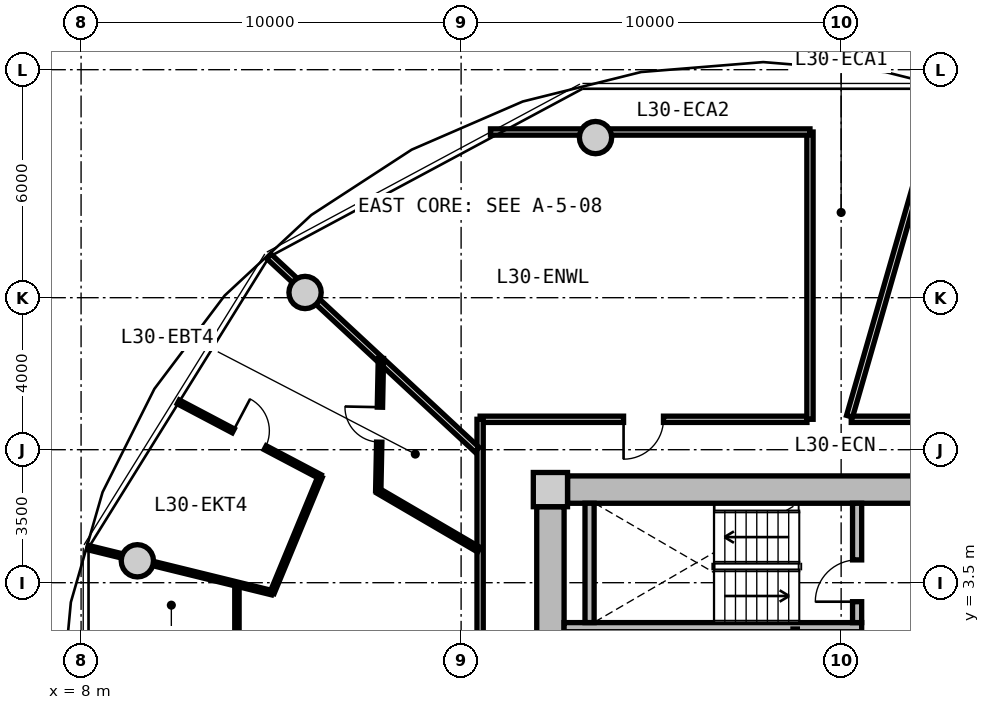
"""IFC4 building model, lengths in metres.
Left out: names, types, materials, properties, quantities, classifications, styles, units other than length and angle.
Written with IfcOpenShell. Run it as: python <this file> out.ifc"""

import sys

from ifc_helpers import new_model, si_unit, direction, frame, frame_2d, origin, origin_2d, place, context, subcontext, project, spatial, rectangle, circle, extrude, source, transform, mapped, element, fill, save


model = new_model("IFC4")
c1 = context("Model", 3, precision=1e-05, world=origin(), true_north=direction((0.0, 1.0)))
c2 = subcontext(c1, "Body", "Model", "MODEL_VIEW")
j1 = project(units=[si_unit("LENGTHUNIT", "METRE"), si_unit("PLANEANGLEUNIT", "RADIAN")], contexts=[c1])
p1 = place(None, origin())
s1 = spatial("IfcSite", under=j1, at=p1, CompositionType="ELEMENT")
p2 = place(p1, origin())
s2 = spatial("IfcBuilding", under=s1, at=p2, CompositionType="ELEMENT")
p3 = place(p2, frame((0.0, 0.0, 99.3)))
s3 = spatial("IfcBuildingStorey", under=s2, at=p3, CompositionType="ELEMENT", Elevation=99.3)
m1 = source(origin(), c2, "Body", "SweptSolid", [
    extrude(rectangle(XDim=0.9, YDim=0.9, at=origin_2d()), origin(), (0.0, 0.0, 1.0), 3.05),
])
p4 = place(p3, frame((20.35, 5.95, 0.0), z_axis=(0.0, 0.0, 1.0), x_axis=(1.0, 0.0, 0.0)))
e1 = element("IfcColumn", 1, at=p4, inside=s3, PredefinedType="COLUMN", context=c2, shape_type="MappedRepresentation", body=[
    mapped(m1, transform((0.0, 0.0, 0.0), x_axis=(1.0, 0.0, 0.0), y_axis=(0.0, 1.0, 0.0), z_axis=(0.0, 0.0, 1.0), scale=1.0)),
])
m2 = source(origin(), c2, "Body", "SweptSolid", [
    extrude(rectangle(XDim=14.4, YDim=0.72, at=frame_2d((7.2, 0.0))), origin(), (0.0, 0.0, 1.0), 2.79),
])
p5 = place(p3, frame((20.8, 5.95, 0.0), z_axis=(0.0, 0.0, 1.0), x_axis=(1.0, 0.0, 0.0)))
e2 = element("IfcWall", 2, at=p5, inside=s3, PredefinedType="SHEAR", context=c2, shape_type="MappedRepresentation", body=[
    mapped(m2, transform((0.0, 0.0, 0.0), x_axis=(1.0, 0.0, 0.0), y_axis=(0.0, 1.0, 0.0), z_axis=(0.0, 0.0, 1.0), scale=1.0)),
])
m3 = source(origin(), c2, "Body", "SweptSolid", [
    extrude(rectangle(XDim=11.0, YDim=0.72, at=frame_2d((5.5, 0.0))), origin(), (0.0, 0.0, 1.0), 2.79),
])
p6 = place(p3, frame((20.35, -5.5, 0.0), z_axis=(0.0, 0.0, 1.0), x_axis=(0.0, 1.0, 0.0)))
e3 = element("IfcWall", 3, at=p6, inside=s3, PredefinedType="SHEAR", context=c2, shape_type="MappedRepresentation", body=[
    mapped(m3, transform((0.0, 0.0, 0.0), x_axis=(1.0, 0.0, 0.0), y_axis=(0.0, 1.0, 0.0), z_axis=(0.0, 0.0, 1.0), scale=1.0)),
])
p7 = place(p6, frame((3.8, 0.0, 0.0)))
e4 = element("IfcOpeningElement", 4, at=p7, cuts=e3, PredefinedType="OPENING", context=c2, shape_type="SweptSolid", body=[
    extrude(rectangle(XDim=1.2, YDim=2.15, at=frame_2d((0.6, 1.075))), frame((0.0, 0.37, 0.0), z_axis=(0.0, -1.0, 0.0), x_axis=(1.0, 0.0, 0.0)), (0.0, 0.0, 1.0), 0.74),
])
m4 = source(origin(), c2, "Body", "SweptSolid", [
    extrude(circle(Radius=0.425, at=origin_2d()), origin(), (0.0, 0.0, 1.0), 3.05),
])
for number, where, z_axis, x_axis in (
    (5, (21.537, 15.213, 0.0), (0.0, 0.0, 1.0), (1.0, 0.0, 0.0)),
    (6, (13.894, 11.137, 0.0), (0.0, 0.0, 1.0), (1.0, 0.0, 0.0)),
    (7, (9.481, 4.076, 0.0), (0.0, 0.0, 1.0), (1.0, 0.0, 0.0)),
):
    element("IfcColumn", number, at=place(p3, frame(where, z_axis=z_axis, x_axis=x_axis)), inside=s3, PredefinedType="COLUMN", context=c2, shape_type="MappedRepresentation", body=[
        mapped(m4, transform((0.0, 0.0, 0.0), x_axis=(1.0, 0.0, 0.0), y_axis=(0.0, 1.0, 0.0), z_axis=(0.0, 0.0, 1.0), scale=1.0)),
    ])
m5 = source(origin(), c2, "Body", "SweptSolid", [
    extrude(rectangle(XDim=7.83, YDim=0.24, at=frame_2d((3.915, 0.0))), origin(), (0.0, 0.0, 1.0), 2.79),
])
p8 = place(p3, frame((20.71, 2.33, 0.0), z_axis=(0.0, 0.0, 1.0), x_axis=(1.0, 0.0, 0.0)))
e8 = element("IfcWall", 8, at=p8, inside=s3, PredefinedType="PARTITIONING", context=c2, shape_type="MappedRepresentation", body=[
    mapped(m5, transform((0.0, 0.0, 0.0), x_axis=(1.0, 0.0, 0.0), y_axis=(0.0, 1.0, 0.0), z_axis=(0.0, 0.0, 1.0), scale=1.0)),
])
m6 = source(origin(), c2, "Body", "SweptSolid", [
    extrude(rectangle(XDim=3.14, YDim=0.24, at=frame_2d((1.57, 0.0))), origin(), (0.0, 0.0, 1.0), 2.79),
])
p9 = place(p3, frame((21.38, 2.45, 0.0), z_axis=(0.0, 0.0, 1.0), x_axis=(0.0, 1.0, 0.0)))
e9 = element("IfcWall", 9, at=p9, inside=s3, PredefinedType="PARTITIONING", context=c2, shape_type="MappedRepresentation", body=[
    mapped(m6, transform((0.0, 0.0, 0.0), x_axis=(1.0, 0.0, 0.0), y_axis=(0.0, 1.0, 0.0), z_axis=(0.0, 0.0, 1.0), scale=1.0)),
])
p10 = place(p3, frame((28.42, 2.45, 0.0), z_axis=(0.0, 0.0, 1.0), x_axis=(0.0, 1.0, 0.0)))
e10 = element("IfcWall", 10, at=p10, inside=s3, PredefinedType="PARTITIONING", context=c2, shape_type="MappedRepresentation", body=[
    mapped(m6, transform((0.0, 0.0, 0.0), x_axis=(1.0, 0.0, 0.0), y_axis=(0.0, 1.0, 0.0), z_axis=(0.0, 0.0, 1.0), scale=1.0)),
])
p11 = place(p10, frame((0.55, 0.0, 0.0)))
e11 = element("IfcOpeningElement", 11, at=p11, cuts=e10, PredefinedType="OPENING", context=c2, shape_type="SweptSolid", body=[
    extrude(rectangle(XDim=1.1, YDim=2.15, at=frame_2d((0.55, 1.075))), frame((0.0, 0.13, 0.0), z_axis=(0.0, -1.0, 0.0), x_axis=(1.0, 0.0, 0.0)), (0.0, 0.0, 1.0), 0.26),
])
m7 = source(origin(), c2, "Body", "SweptSolid", [
    extrude(rectangle(XDim=2.33, YDim=0.115, at=frame_2d((1.165, 0.0))), origin(), (0.0, 0.0, 1.0), 2.775),
])
p12 = place(p3, frame((26.79, -0.05, 0.0), z_axis=(0.0, 0.0, 1.0), x_axis=(0.0, 1.0, 0.0)))
e12 = element("IfcWall", 12, at=p12, inside=s3, PredefinedType="PARTITIONING", context=c2, shape_type="MappedRepresentation", body=[
    mapped(m7, transform((0.0, 0.0, 0.0), x_axis=(1.0, 0.0, 0.0), y_axis=(0.0, 1.0, 0.0), z_axis=(0.0, 0.0, 1.0), scale=1.0)),
])
m8 = source(origin(), c2, "Body", "SweptSolid", [
    extrude(rectangle(XDim=8.6, YDim=0.165, at=frame_2d((4.3, 0.0))), origin(), (0.0, 0.0, 1.0), 2.775),
])
p13 = place(p3, frame((18.5, 7.8, 0.0), z_axis=(0.0, 0.0, 1.0), x_axis=(1.0, 0.0, 0.0)))
e13 = element("IfcWall", 13, at=p13, inside=s3, PredefinedType="PARTITIONING", context=c2, shape_type="MappedRepresentation", body=[
    mapped(m8, transform((0.0, 0.0, 0.0), x_axis=(1.0, 0.0, 0.0), y_axis=(0.0, 1.0, 0.0), z_axis=(0.0, 0.0, 1.0), scale=1.0)),
])
p14 = place(p13, frame((3.775, 0.0, 0.0)))
e14 = element("IfcOpeningElement", 14, at=p14, cuts=e13, PredefinedType="OPENING", context=c2, shape_type="SweptSolid", body=[
    extrude(rectangle(XDim=1.05, YDim=2.15, at=frame_2d((0.525, 1.075))), frame((0.0, 0.093, 0.0), z_axis=(0.0, -1.0, 0.0), x_axis=(1.0, 0.0, 0.0)), (0.0, 0.0, 1.0), 0.185),
])
m9 = source(origin(), c2, "Body", "SweptSolid", [
    extrude(rectangle(XDim=9.234, YDim=0.165, at=frame_2d((4.617, 0.0))), origin(), (0.0, 0.0, 1.0), 2.775),
])
p15 = place(p3, frame((28.266, 7.8, 0.0), z_axis=(0.0, 0.0, 1.0), x_axis=(1.0, 0.0, 0.0)))
e15 = element("IfcWall", 15, at=p15, inside=s3, PredefinedType="PARTITIONING", context=c2, shape_type="MappedRepresentation", body=[
    mapped(m9, transform((0.0, 0.0, 0.0), x_axis=(1.0, 0.0, 0.0), y_axis=(0.0, 1.0, 0.0), z_axis=(0.0, 0.0, 1.0), scale=1.0)),
])
p16 = place(p15, frame((4.092, 0.0, 0.0)))
e16 = element("IfcOpeningElement", 16, at=p16, cuts=e15, PredefinedType="OPENING", context=c2, shape_type="SweptSolid", body=[
    extrude(rectangle(XDim=1.05, YDim=2.15, at=frame_2d((0.525, 1.075))), frame((0.0, 0.093, 0.0), z_axis=(0.0, -1.0, 0.0), x_axis=(1.0, 0.0, 0.0)), (0.0, 0.0, 1.0), 0.185),
])
m10 = source(origin(), c2, "Body", "SweptSolid", [
    extrude(rectangle(XDim=15.6, YDim=0.165, at=frame_2d((7.8, 0.0))), origin(), (0.0, 0.0, 1.0), 2.775),
])
p17 = place(p3, frame((18.5, -7.8, 0.0), z_axis=(0.0, 0.0, 1.0), x_axis=(0.0, 1.0, 0.0)))
e17 = element("IfcWall", 17, at=p17, inside=s3, PredefinedType="PARTITIONING", context=c2, shape_type="MappedRepresentation", body=[
    mapped(m10, transform((0.0, 0.0, 0.0), x_axis=(1.0, 0.0, 0.0), y_axis=(0.0, 1.0, 0.0), z_axis=(0.0, 0.0, 1.0), scale=1.0)),
])
p18 = place(p17, frame((5.673, 0.0, 0.0)))
e18 = element("IfcOpeningElement", 18, at=p18, cuts=e17, PredefinedType="OPENING", context=c2, shape_type="SweptSolid", body=[
    extrude(rectangle(XDim=1.05, YDim=2.15, at=frame_2d((0.525, 1.075))), frame((0.0, 0.093, 0.0), z_axis=(0.0, -1.0, 0.0), x_axis=(1.0, 0.0, 0.0)), (0.0, 0.0, 1.0), 0.185),
])
m11 = source(origin(), c2, "Body", "SweptSolid", [
    extrude(rectangle(XDim=8.989, YDim=0.165, at=frame_2d((4.495, 0.0))), origin(), (0.0, 0.0, 1.0), 2.275),
])
p19 = place(p3, frame((28.222, 7.88, 0.0), z_axis=(0.0, 0.0, 1.0), x_axis=(0.27702323008, 0.960863221274, 0.0)))
e19 = element("IfcWall", 19, at=p19, inside=s3, PredefinedType="PARTITIONING", context=c2, shape_type="MappedRepresentation", body=[
    mapped(m11, transform((0.0, 0.0, 0.0), x_axis=(1.0, 0.0, 0.0), y_axis=(0.0, 1.0, 0.0), z_axis=(0.0, 0.0, 1.0), scale=1.0)),
])
m12 = source(origin(), c2, "Body", "SweptSolid", [
    extrude(rectangle(XDim=7.482, YDim=0.165, at=frame_2d((3.741, 0.0))), origin(), (0.0, 0.0, 1.0), 2.275),
])
p20 = place(p3, frame((18.42, 6.998, 0.0), z_axis=(0.0, 0.0, 1.0), x_axis=(-0.732508698043, 0.680757671489, 0.0)))
e20 = element("IfcWall", 20, at=p20, inside=s3, PredefinedType="PARTITIONING", context=c2, shape_type="MappedRepresentation", body=[
    mapped(m12, transform((0.0, 0.0, 0.0), x_axis=(1.0, 0.0, 0.0), y_axis=(0.0, 1.0, 0.0), z_axis=(0.0, 0.0, 1.0), scale=1.0)),
])
m13 = source(origin(), c2, "Body", "SweptSolid", [
    extrude(rectangle(XDim=7.56, YDim=0.165, at=frame_2d((3.78, 0.0))), origin(), (0.0, 0.0, 1.0), 2.775),
])
p21 = place(p3, frame((27.18, 7.8, 0.0), z_axis=(0.0, 0.0, 1.0), x_axis=(0.0, 1.0, 0.0)))
e21 = element("IfcWall", 21, at=p21, inside=s3, PredefinedType="PARTITIONING", context=c2, shape_type="MappedRepresentation", body=[
    mapped(m13, transform((0.0, 0.0, 0.0), x_axis=(1.0, 0.0, 0.0), y_axis=(0.0, 1.0, 0.0), z_axis=(0.0, 0.0, 1.0), scale=1.0)),
])
m14 = source(origin(), c2, "Body", "SweptSolid", [
    extrude(rectangle(XDim=8.407, YDim=0.165, at=frame_2d((4.204, 0.0))), origin(), (0.0, 0.0, 1.0), 2.275),
])
p22 = place(p3, frame((18.773, 15.36, 0.0), z_axis=(0.0, 0.0, 1.0), x_axis=(1.0, 0.0, 0.0)))
e22 = element("IfcWall", 22, at=p22, inside=s3, PredefinedType="PARTITIONING", context=c2, shape_type="MappedRepresentation", body=[
    mapped(m14, transform((0.0, 0.0, 0.0), x_axis=(1.0, 0.0, 0.0), y_axis=(0.0, 1.0, 0.0), z_axis=(0.0, 0.0, 1.0), scale=1.0)),
])
m15 = source(origin(), c2, "Body", "SweptSolid", [
    extrude(rectangle(XDim=6.935, YDim=0.115, at=frame_2d((3.468, 0.0))), origin(), (0.0, 0.0, 1.0), 2.775),
])
p23 = place(p3, frame((12.101, 3.468, 0.0), z_axis=(0.0, 0.0, 1.0), x_axis=(0.0, -1.0, 0.0)))
e23 = element("IfcWall", 23, at=p23, inside=s3, PredefinedType="PARTITIONING", context=c2, shape_type="MappedRepresentation", body=[
    mapped(m15, transform((0.0, 0.0, 0.0), x_axis=(1.0, 0.0, 0.0), y_axis=(0.0, 1.0, 0.0), z_axis=(0.0, 0.0, 1.0), scale=1.0)),
])
p24 = place(p23, frame((2.993, 0.0, 0.0)))
e24 = element("IfcOpeningElement", 24, at=p24, cuts=e23, PredefinedType="OPENING", context=c2, shape_type="SweptSolid", body=[
    extrude(rectangle(XDim=0.95, YDim=2.1, at=frame_2d((0.475, 1.05))), frame((0.0, 0.067, 0.0), z_axis=(0.0, -1.0, 0.0), x_axis=(1.0, 0.0, 0.0)), (0.0, 0.0, 1.0), 0.135),
])
m16 = source(origin(), c2, "Body", "SweptSolid", [
    extrude(rectangle(XDim=4.992, YDim=0.115, at=frame_2d((2.496, 0.0))), origin(), (0.0, 0.0, 1.0), 2.275),
])
p25 = place(p3, frame((13.026, 3.236, 0.0), z_axis=(0.0, 0.0, 1.0), x_axis=(-0.971191841847, 0.238298985162, 0.0)))
e25 = element("IfcWall", 25, at=p25, inside=s3, PredefinedType="PARTITIONING", context=c2, shape_type="MappedRepresentation", body=[
    mapped(m16, transform((0.0, 0.0, 0.0), x_axis=(1.0, 0.0, 0.0), y_axis=(0.0, 1.0, 0.0), z_axis=(0.0, 0.0, 1.0), scale=1.0)),
])
m17 = source(origin(), c2, "Body", "SweptSolid", [
    extrude(rectangle(XDim=3.069, YDim=0.14, at=frame_2d((1.535, 0.0))), origin(), (0.0, 0.0, 1.0), 2.775),
])
p26 = place(p3, frame((18.47, 4.368, 0.0), z_axis=(0.0, 0.0, 1.0), x_axis=(-0.863524911282, 0.504306184371, 0.0)))
e26 = element("IfcWall", 26, at=p26, inside=s3, PredefinedType="PARTITIONING", context=c2, shape_type="MappedRepresentation", body=[
    mapped(m17, transform((0.0, 0.0, 0.0), x_axis=(1.0, 0.0, 0.0), y_axis=(0.0, 1.0, 0.0), z_axis=(0.0, 0.0, 1.0), scale=1.0)),
])
m18 = source(origin(), c2, "Body", "SweptSolid", [
    extrude(rectangle(XDim=3.487, YDim=0.14, at=frame_2d((1.743, 0.0))), origin(), (0.0, 0.0, 1.0), 2.775),
])
p27 = place(p3, frame((15.82, 5.916, 0.0), z_axis=(0.0, 0.0, 1.0), x_axis=(0.020026799331, 0.999799443543, 0.0)))
e27 = element("IfcWall", 27, at=p27, inside=s3, PredefinedType="PARTITIONING", context=c2, shape_type="MappedRepresentation", body=[
    mapped(m18, transform((0.0, 0.0, 0.0), x_axis=(1.0, 0.0, 0.0), y_axis=(0.0, 1.0, 0.0), z_axis=(0.0, 0.0, 1.0), scale=1.0)),
])
p28 = place(p27, frame((1.283, 0.0, 0.0)))
e28 = element("IfcOpeningElement", 28, at=p28, cuts=e27, PredefinedType="OPENING", context=c2, shape_type="SweptSolid", body=[
    extrude(rectangle(XDim=0.92, YDim=2.1, at=frame_2d((0.46, 1.05))), frame((0.0, 0.08, 0.0), z_axis=(0.0, -1.0, 0.0), x_axis=(1.0, 0.0, 0.0)), (0.0, 0.0, 1.0), 0.16),
])
m19 = source(origin(), c2, "Body", "SweptSolid", [
    extrude(rectangle(XDim=4.221, YDim=0.115, at=frame_2d((2.11, 0.0))), origin(), (0.0, 0.0, 1.0), 2.775),
])
p29 = place(p3, frame((14.292, 6.29, 0.0), z_axis=(0.0, 0.0, 1.0), x_axis=(-0.88458298465, 0.466382829087, 0.0)))
e29 = element("IfcWall", 29, at=p29, inside=s3, PredefinedType="PARTITIONING", context=c2, shape_type="MappedRepresentation", body=[
    mapped(m19, transform((0.0, 0.0, 0.0), x_axis=(1.0, 0.0, 0.0), y_axis=(0.0, 1.0, 0.0), z_axis=(0.0, 0.0, 1.0), scale=1.0)),
])
p30 = place(p29, frame((1.635, 0.0, 0.0)))
e30 = element("IfcOpeningElement", 30, at=p30, cuts=e29, PredefinedType="OPENING", context=c2, shape_type="SweptSolid", body=[
    extrude(rectangle(XDim=0.95, YDim=2.1, at=frame_2d((0.475, 1.05))), frame((0.0, 0.067, 0.0), z_axis=(0.0, -1.0, 0.0), x_axis=(1.0, 0.0, 0.0)), (0.0, 0.0, 1.0), 0.135),
])
m20 = source(origin(), c2, "Body", "SweptSolid", [
    extrude(rectangle(XDim=3.306, YDim=0.115, at=frame_2d((1.653, 0.0))), origin(), (0.0, 0.0, 1.0), 2.775),
])
p31 = place(p3, frame((14.292, 6.29, 0.0), z_axis=(0.0, 0.0, 1.0), x_axis=(-0.382506175075, -0.923952934965, 0.0)))
e31 = element("IfcWall", 31, at=p31, inside=s3, PredefinedType="PARTITIONING", context=c2, shape_type="MappedRepresentation", body=[
    mapped(m20, transform((0.0, 0.0, 0.0), x_axis=(1.0, 0.0, 0.0), y_axis=(0.0, 1.0, 0.0), z_axis=(0.0, 0.0, 1.0), scale=1.0)),
])
m21 = source(origin(), c2, "Body", "SweptSolid", [
    extrude(rectangle(XDim=1.1, YDim=2.15, at=frame_2d((0.55, 1.075))), frame((0.0, 0.025, 0.0), z_axis=(0.0, -1.0, 0.0), x_axis=(1.0, 0.0, 0.0)), (0.0, 0.0, 1.0), 0.05),
])
p32 = place(p11, origin())
e32 = element("IfcDoor", 32, at=p32, inside=s3, OperationType="SINGLE_SWING_LEFT", PredefinedType="DOOR", context=c2, shape_type="MappedRepresentation", body=[
    mapped(m21, transform((0.0, 0.0, 0.0), x_axis=(1.0, 0.0, 0.0), y_axis=(0.0, 1.0, 0.0), z_axis=(0.0, 0.0, 1.0), scale=1.0)),
])
fill(e11, e32)
m22 = source(origin(), c2, "Body", "SweptSolid", [
    extrude(rectangle(XDim=1.05, YDim=2.15, at=frame_2d((0.525, 1.075))), frame((0.0, 0.025, 0.0), z_axis=(0.0, -1.0, 0.0), x_axis=(1.0, 0.0, 0.0)), (0.0, 0.0, 1.0), 0.05),
])
p33 = place(p14, frame((1.05, 0.0, 0.0), z_axis=(0.0, 0.0, 1.0), x_axis=(-1.0, 0.0, 0.0)))
e33 = element("IfcDoor", 33, at=p33, inside=s3, OperationType="SINGLE_SWING_RIGHT", PredefinedType="DOOR", context=c2, shape_type="MappedRepresentation", body=[
    mapped(m22, transform((0.0, 0.0, 0.0), x_axis=(1.0, 0.0, 0.0), y_axis=(0.0, 1.0, 0.0), z_axis=(0.0, 0.0, 1.0), scale=1.0)),
])
fill(e14, e33)
m23 = source(origin(), c2, "Body", "SweptSolid", [
    extrude(rectangle(XDim=0.92, YDim=2.1, at=frame_2d((0.46, 1.05))), frame((0.0, 0.025, 0.0), z_axis=(0.0, -1.0, 0.0), x_axis=(1.0, 0.0, 0.0)), (0.0, 0.0, 1.0), 0.05),
])
p34 = place(p28, origin())
e34 = element("IfcDoor", 34, at=p34, inside=s3, OperationType="SINGLE_SWING_RIGHT", PredefinedType="DOOR", context=c2, shape_type="MappedRepresentation", body=[
    mapped(m23, transform((0.0, 0.0, 0.0), x_axis=(1.0, 0.0, 0.0), y_axis=(0.0, 1.0, 0.0), z_axis=(0.0, 0.0, 1.0), scale=1.0)),
])
fill(e28, e34)
m24 = source(origin(), c2, "Body", "SweptSolid", [
    extrude(rectangle(XDim=0.95, YDim=2.1, at=frame_2d((0.475, 1.05))), frame((0.0, 0.025, 0.0), z_axis=(0.0, -1.0, 0.0), x_axis=(1.0, 0.0, 0.0)), (0.0, 0.0, 1.0), 0.05),
])
p35 = place(p30, frame((0.95, 0.0, 0.0), z_axis=(0.0, 0.0, 1.0), x_axis=(-1.0, 0.0, 0.0)))
e35 = element("IfcDoor", 35, at=p35, inside=s3, OperationType="SINGLE_SWING_LEFT", PredefinedType="DOOR", context=c2, shape_type="MappedRepresentation", body=[
    mapped(m24, transform((0.0, 0.0, 0.0), x_axis=(1.0, 0.0, 0.0), y_axis=(0.0, 1.0, 0.0), z_axis=(0.0, 0.0, 1.0), scale=1.0)),
])
fill(e30, e35)
save(model, sys.argv[1])
